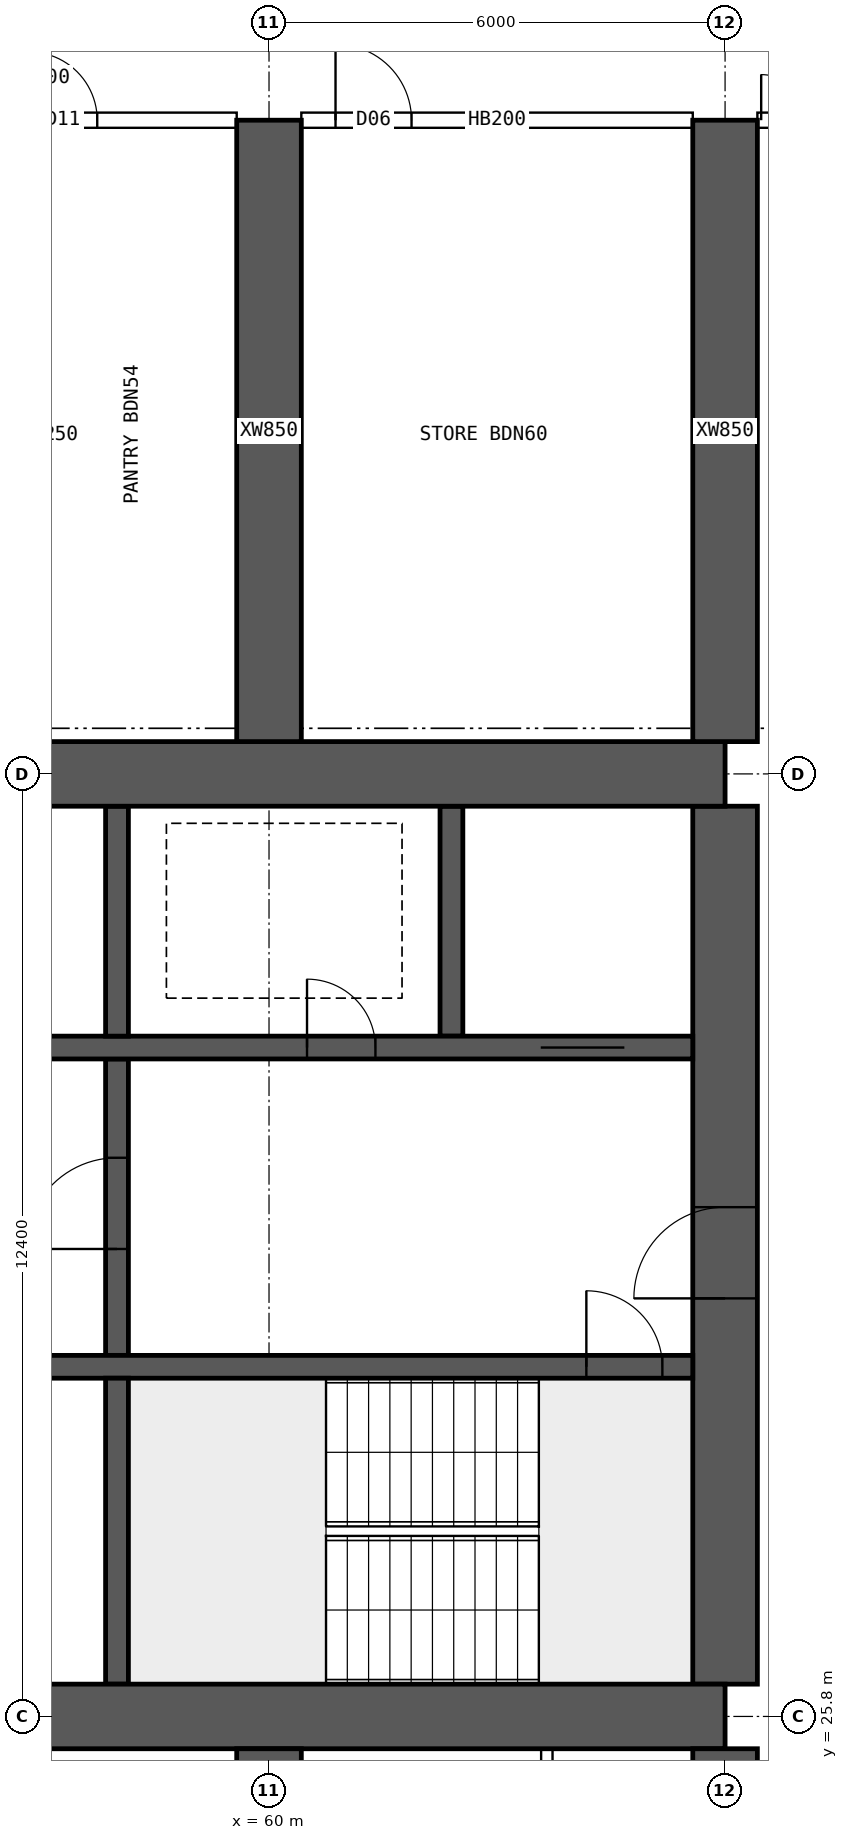
"""IFC4 building model, lengths in metres.
Left out: names, types, materials, properties, quantities, classifications, styles, units other than length and angle.
Written with IfcOpenShell. Run it as: python <this file> out.ifc"""

import sys

from ifc_helpers import new_model, si_unit, direction, frame, frame_2d, origin, place, context, subcontext, project, spatial, rectangle, extrude, element, fill, save


model = new_model("IFC4")
c1 = context("Model", 3, precision=1e-05, world=origin(), true_north=direction((0.0, 1.0)))
c2 = subcontext(c1, "Body", "Model", "MODEL_VIEW")
j1 = project(units=[si_unit("LENGTHUNIT", "METRE"), si_unit("PLANEANGLEUNIT", "RADIAN")], contexts=[c1])
p1 = place(None, origin())
s1 = spatial("IfcSite", under=j1, at=p1, CompositionType="ELEMENT")
p2 = place(p1, origin())
s2 = spatial("IfcBuilding", under=s1, at=p2, CompositionType="ELEMENT")
p3 = place(p2, frame((0.0, 0.0, 193.6)))
s3 = spatial("IfcBuildingStorey", under=s2, at=p3, CompositionType="ELEMENT", Elevation=193.6)
for number, where, z_axis, x_axis in (
    (1, (18.0, 25.8, 0.0), (0.0, 0.0, 1.0), (1.0, 0.0, 0.0)),
    (2, (18.0, 38.2, 0.0), (0.0, 0.0, 1.0), (1.0, 0.0, 0.0)),
):
    element("IfcWall", number, at=place(p3, frame(where, z_axis=z_axis, x_axis=x_axis)), inside=s3, PredefinedType="SHEAR", context=c2, shape_type="SweptSolid", body=[
        extrude(rectangle(XDim=48.0, YDim=0.85, at=frame_2d((24.0, 0.0))), origin(), (0.0, 0.0, 1.0), 3.75),
    ])
p4 = place(p3, frame((66.0, 26.225, 0.0), z_axis=(0.0, 0.0, 1.0), x_axis=(0.0, 1.0, 0.0)))
e3 = element("IfcWall", 3, at=p4, inside=s3, PredefinedType="SHEAR", context=c2, shape_type="SweptSolid", body=[
    extrude(rectangle(XDim=11.55, YDim=0.85, at=frame_2d((5.775, 0.0))), origin(), (0.0, 0.0, 1.0), 3.75),
])
p5 = place(p4, frame((5.075, 0.0, 0.0)))
e4 = element("IfcOpeningElement", 4, at=p5, cuts=e3, PredefinedType="OPENING", context=c2, shape_type="SweptSolid", body=[
    extrude(rectangle(XDim=1.2, YDim=2.1, at=frame_2d((0.6, 1.05))), frame((0.0, 0.435, 0.0), z_axis=(0.0, -1.0, 0.0), x_axis=(1.0, 0.0, 0.0)), (0.0, 0.0, 1.0), 0.87),
])
p6 = place(p3, frame((18.425, 30.4, 0.0), z_axis=(0.0, 0.0, 1.0), x_axis=(1.0, 0.0, 0.0)))
e5 = element("IfcWall", 5, at=p6, inside=s3, PredefinedType="SHEAR", context=c2, shape_type="SweptSolid", body=[
    extrude(rectangle(XDim=47.15, YDim=0.3, at=frame_2d((23.575, 0.0))), origin(), (0.0, 0.0, 1.0), 3.75),
])
p7 = place(p6, frame((0.4, 0.0, 0.0)))
e6 = element("IfcOpeningElement", 6, at=p7, cuts=e5, PredefinedType="OPENING", context=c2, shape_type="SweptSolid", body=[
    extrude(rectangle(XDim=1.0, YDim=2.1, at=frame_2d((0.5, 1.05))), frame((0.0, 0.16, 0.0), z_axis=(0.0, -1.0, 0.0), x_axis=(1.0, 0.0, 0.0)), (0.0, 0.0, 1.0), 0.32),
])
p8 = place(p6, frame((45.75, 0.0, 0.0)))
e7 = element("IfcOpeningElement", 7, at=p8, cuts=e5, PredefinedType="OPENING", context=c2, shape_type="SweptSolid", body=[
    extrude(rectangle(XDim=1.0, YDim=2.1, at=frame_2d((0.5, 1.05))), frame((0.0, 0.16, 0.0), z_axis=(0.0, -1.0, 0.0), x_axis=(1.0, 0.0, 0.0)), (0.0, 0.0, 1.0), 0.32),
])
p9 = place(p6, frame((8.325, 0.0, 0.0)))
e8 = element("IfcOpeningElement", 8, at=p9, cuts=e5, PredefinedType="OPENING", context=c2, shape_type="SweptSolid", body=[
    extrude(rectangle(XDim=1.1, YDim=2.1, at=frame_2d((0.55, 1.05))), frame((0.0, 0.16, 0.0), z_axis=(0.0, -1.0, 0.0), x_axis=(1.0, 0.0, 0.0)), (0.0, 0.0, 1.0), 0.32),
])
p10 = place(p6, frame((10.925, 0.0, 0.0)))
e9 = element("IfcOpeningElement", 9, at=p10, cuts=e5, PredefinedType="OPENING", context=c2, shape_type="SweptSolid", body=[
    extrude(rectangle(XDim=1.1, YDim=2.1, at=frame_2d((0.55, 1.05))), frame((0.0, 0.16, 0.0), z_axis=(0.0, -1.0, 0.0), x_axis=(1.0, 0.0, 0.0)), (0.0, 0.0, 1.0), 0.32),
])
p11 = place(p6, frame((13.525, 0.0, 0.0)))
e10 = element("IfcOpeningElement", 10, at=p11, cuts=e5, PredefinedType="OPENING", context=c2, shape_type="SweptSolid", body=[
    extrude(rectangle(XDim=1.1, YDim=2.1, at=frame_2d((0.55, 1.05))), frame((0.0, 0.16, 0.0), z_axis=(0.0, -1.0, 0.0), x_axis=(1.0, 0.0, 0.0)), (0.0, 0.0, 1.0), 0.32),
])
p12 = place(p6, frame((16.125, 0.0, 0.0)))
e11 = element("IfcOpeningElement", 11, at=p12, cuts=e5, PredefinedType="OPENING", context=c2, shape_type="SweptSolid", body=[
    extrude(rectangle(XDim=1.1, YDim=2.1, at=frame_2d((0.55, 1.05))), frame((0.0, 0.16, 0.0), z_axis=(0.0, -1.0, 0.0), x_axis=(1.0, 0.0, 0.0)), (0.0, 0.0, 1.0), 0.32),
])
p13 = place(p6, frame((18.9, 0.0, 0.0)))
e12 = element("IfcOpeningElement", 12, at=p13, cuts=e5, PredefinedType="OPENING", context=c2, shape_type="SweptSolid", body=[
    extrude(rectangle(XDim=0.9, YDim=2.1, at=frame_2d((0.45, 1.05))), frame((0.0, 0.16, 0.0), z_axis=(0.0, -1.0, 0.0), x_axis=(1.0, 0.0, 0.0)), (0.0, 0.0, 1.0), 0.32),
])
p14 = place(p6, frame((30.192, 0.0, 0.0)))
e13 = element("IfcOpeningElement", 13, at=p14, cuts=e5, PredefinedType="OPENING", context=c2, shape_type="SweptSolid", body=[
    extrude(rectangle(XDim=1.1, YDim=2.1, at=frame_2d((0.55, 1.05))), frame((0.0, 0.16, 0.0), z_axis=(0.0, -1.0, 0.0), x_axis=(1.0, 0.0, 0.0)), (0.0, 0.0, 1.0), 0.32),
])
p15 = place(p6, frame((33.725, 0.0, 0.0)))
e14 = element("IfcOpeningElement", 14, at=p15, cuts=e5, PredefinedType="OPENING", context=c2, shape_type="SweptSolid", body=[
    extrude(rectangle(XDim=1.1, YDim=2.1, at=frame_2d((0.55, 1.05))), frame((0.0, 0.16, 0.0), z_axis=(0.0, -1.0, 0.0), x_axis=(1.0, 0.0, 0.0)), (0.0, 0.0, 1.0), 0.32),
])
p16 = place(p6, frame((37.258, 0.0, 0.0)))
e15 = element("IfcOpeningElement", 15, at=p16, cuts=e5, PredefinedType="OPENING", context=c2, shape_type="SweptSolid", body=[
    extrude(rectangle(XDim=1.1, YDim=2.1, at=frame_2d((0.55, 1.05))), frame((0.0, 0.16, 0.0), z_axis=(0.0, -1.0, 0.0), x_axis=(1.0, 0.0, 0.0)), (0.0, 0.0, 1.0), 0.32),
])
p17 = place(p3, frame((18.425, 34.6, 0.0), z_axis=(0.0, 0.0, 1.0), x_axis=(1.0, 0.0, 0.0)))
e16 = element("IfcWall", 16, at=p17, inside=s3, PredefinedType="SHEAR", context=c2, shape_type="SweptSolid", body=[
    extrude(rectangle(XDim=47.15, YDim=0.3, at=frame_2d((23.575, 0.0))), origin(), (0.0, 0.0, 1.0), 3.75),
])
p18 = place(p17, frame((0.9, 0.0, 0.0)))
e17 = element("IfcOpeningElement", 17, at=p18, cuts=e16, PredefinedType="OPENING", context=c2, shape_type="SweptSolid", body=[
    extrude(rectangle(XDim=1.1, YDim=2.1, at=frame_2d((0.55, 1.05))), frame((0.0, 0.16, 0.0), z_axis=(0.0, -1.0, 0.0), x_axis=(1.0, 0.0, 0.0)), (0.0, 0.0, 1.0), 0.32),
])
p19 = place(p17, frame((45.15, 0.0, 0.0)))
e18 = element("IfcOpeningElement", 18, at=p19, cuts=e16, PredefinedType="OPENING", context=c2, shape_type="SweptSolid", body=[
    extrude(rectangle(XDim=1.1, YDim=2.1, at=frame_2d((0.55, 1.05))), frame((0.0, 0.16, 0.0), z_axis=(0.0, -1.0, 0.0), x_axis=(1.0, 0.0, 0.0)), (0.0, 0.0, 1.0), 0.32),
])
p20 = place(p17, frame((4.175, 0.0, 0.0)))
e19 = element("IfcOpeningElement", 19, at=p20, cuts=e16, PredefinedType="OPENING", context=c2, shape_type="SweptSolid", body=[
    extrude(rectangle(XDim=0.9, YDim=2.1, at=frame_2d((0.45, 1.05))), frame((0.0, 0.16, 0.0), z_axis=(0.0, -1.0, 0.0), x_axis=(1.0, 0.0, 0.0)), (0.0, 0.0, 1.0), 0.32),
])
p21 = place(p17, frame((42.075, 0.0, 0.0)))
e20 = element("IfcOpeningElement", 20, at=p21, cuts=e16, PredefinedType="OPENING", context=c2, shape_type="SweptSolid", body=[
    extrude(rectangle(XDim=0.9, YDim=2.1, at=frame_2d((0.45, 1.05))), frame((0.0, 0.16, 0.0), z_axis=(0.0, -1.0, 0.0), x_axis=(1.0, 0.0, 0.0)), (0.0, 0.0, 1.0), 0.32),
])
p22 = place(p17, frame((8.95, 0.0, 0.0)))
e21 = element("IfcOpeningElement", 21, at=p22, cuts=e16, PredefinedType="OPENING", context=c2, shape_type="SweptSolid", body=[
    extrude(rectangle(XDim=0.9, YDim=2.1, at=frame_2d((0.45, 1.05))), frame((0.0, 0.16, 0.0), z_axis=(0.0, -1.0, 0.0), x_axis=(1.0, 0.0, 0.0)), (0.0, 0.0, 1.0), 0.32),
])
p23 = place(p17, frame((12.924, 0.0, 0.0)))
e22 = element("IfcOpeningElement", 22, at=p23, cuts=e16, PredefinedType="OPENING", context=c2, shape_type="SweptSolid", body=[
    extrude(rectangle(XDim=0.9, YDim=2.1, at=frame_2d((0.45, 1.05))), frame((0.0, 0.16, 0.0), z_axis=(0.0, -1.0, 0.0), x_axis=(1.0, 0.0, 0.0)), (0.0, 0.0, 1.0), 0.32),
])
p24 = place(p17, frame((16.571, 0.0, 0.0)))
e23 = element("IfcOpeningElement", 23, at=p24, cuts=e16, PredefinedType="OPENING", context=c2, shape_type="SweptSolid", body=[
    extrude(rectangle(XDim=0.9, YDim=2.1, at=frame_2d((0.45, 1.05))), frame((0.0, 0.16, 0.0), z_axis=(0.0, -1.0, 0.0), x_axis=(1.0, 0.0, 0.0)), (0.0, 0.0, 1.0), 0.32),
])
p25 = place(p17, frame((20.33, 0.0, 0.0)))
e24 = element("IfcOpeningElement", 24, at=p25, cuts=e16, PredefinedType="OPENING", context=c2, shape_type="SweptSolid", body=[
    extrude(rectangle(XDim=0.9, YDim=2.1, at=frame_2d((0.45, 1.05))), frame((0.0, 0.16, 0.0), z_axis=(0.0, -1.0, 0.0), x_axis=(1.0, 0.0, 0.0)), (0.0, 0.0, 1.0), 0.32),
])
p26 = place(p17, frame((24.736, 0.0, 0.0)))
e25 = element("IfcOpeningElement", 25, at=p26, cuts=e16, PredefinedType="OPENING", context=c2, shape_type="SweptSolid", body=[
    extrude(rectangle(XDim=0.9, YDim=2.1, at=frame_2d((0.45, 1.05))), frame((0.0, 0.16, 0.0), z_axis=(0.0, -1.0, 0.0), x_axis=(1.0, 0.0, 0.0)), (0.0, 0.0, 1.0), 0.32),
])
p27 = place(p17, frame((27.533, 0.0, 0.0)))
e26 = element("IfcOpeningElement", 26, at=p27, cuts=e16, PredefinedType="OPENING", context=c2, shape_type="SweptSolid", body=[
    extrude(rectangle(XDim=0.9, YDim=2.1, at=frame_2d((0.45, 1.05))), frame((0.0, 0.16, 0.0), z_axis=(0.0, -1.0, 0.0), x_axis=(1.0, 0.0, 0.0)), (0.0, 0.0, 1.0), 0.32),
])
p28 = place(p17, frame((29.703, 0.0, 0.0)))
e27 = element("IfcOpeningElement", 27, at=p28, cuts=e16, PredefinedType="OPENING", context=c2, shape_type="SweptSolid", body=[
    extrude(rectangle(XDim=0.9, YDim=2.1, at=frame_2d((0.45, 1.05))), frame((0.0, 0.16, 0.0), z_axis=(0.0, -1.0, 0.0), x_axis=(1.0, 0.0, 0.0)), (0.0, 0.0, 1.0), 0.32),
])
p29 = place(p17, frame((33.502, 0.0, 0.0)))
e28 = element("IfcOpeningElement", 28, at=p29, cuts=e16, PredefinedType="OPENING", context=c2, shape_type="SweptSolid", body=[
    extrude(rectangle(XDim=0.9, YDim=2.1, at=frame_2d((0.45, 1.05))), frame((0.0, 0.16, 0.0), z_axis=(0.0, -1.0, 0.0), x_axis=(1.0, 0.0, 0.0)), (0.0, 0.0, 1.0), 0.32),
])
p30 = place(p17, frame((37.453, 0.0, 0.0)))
e29 = element("IfcOpeningElement", 29, at=p30, cuts=e16, PredefinedType="OPENING", context=c2, shape_type="SweptSolid", body=[
    extrude(rectangle(XDim=0.9, YDim=2.1, at=frame_2d((0.45, 1.05))), frame((0.0, 0.16, 0.0), z_axis=(0.0, -1.0, 0.0), x_axis=(1.0, 0.0, 0.0)), (0.0, 0.0, 1.0), 0.32),
])
p31 = place(p3, frame((58.0, 26.225, 0.0), z_axis=(0.0, 0.0, 1.0), x_axis=(0.0, 1.0, 0.0)))
e30 = element("IfcWall", 30, at=p31, inside=s3, PredefinedType="SHEAR", context=c2, shape_type="SweptSolid", body=[
    extrude(rectangle(XDim=4.025, YDim=0.3, at=frame_2d((2.012, 0.0))), origin(), (0.0, 0.0, 1.0), 3.75),
])
p32 = place(p3, frame((58.0, 30.55, 0.0), z_axis=(0.0, 0.0, 1.0), x_axis=(0.0, 1.0, 0.0)))
e31 = element("IfcWall", 31, at=p32, inside=s3, PredefinedType="SHEAR", context=c2, shape_type="SweptSolid", body=[
    extrude(rectangle(XDim=3.9, YDim=0.3, at=frame_2d((1.95, 0.0))), origin(), (0.0, 0.0, 1.0), 3.75),
])
p33 = place(p32, frame((1.4, 0.0, 0.0)))
e32 = element("IfcOpeningElement", 32, at=p33, cuts=e31, PredefinedType="OPENING", context=c2, shape_type="SweptSolid", body=[
    extrude(rectangle(XDim=1.2, YDim=2.1, at=frame_2d((0.6, 1.05))), frame((0.0, 0.16, 0.0), z_axis=(0.0, -1.0, 0.0), x_axis=(1.0, 0.0, 0.0)), (0.0, 0.0, 1.0), 0.32),
])
for number, where, z_axis, x_axis in (
    (33, (62.4, 34.75, 0.0), (0.0, 0.0, 1.0), (0.0, 1.0, 0.0)),
    (34, (58.0, 34.75, 0.0), (0.0, 0.0, 1.0), (0.0, 1.0, 0.0)),
):
    element("IfcWall", number, at=place(p3, frame(where, z_axis=z_axis, x_axis=x_axis)), inside=s3, PredefinedType="SHEAR", context=c2, shape_type="SweptSolid", body=[
        extrude(rectangle(XDim=3.025, YDim=0.3, at=frame_2d((1.512, 0.0))), origin(), (0.0, 0.0, 1.0), 3.75),
    ])
for number, where, z_axis, x_axis in (
    (35, (60.0, 17.2, 0.0), (0.0, 0.0, 1.0), (0.0, 1.0, 0.0)),
    (36, (60.0, 38.625, 0.0), (0.0, 0.0, 1.0), (0.0, 1.0, 0.0)),
    (37, (66.0, 17.2, 0.0), (0.0, 0.0, 1.0), (0.0, 1.0, 0.0)),
    (38, (66.0, 38.625, 0.0), (0.0, 0.0, 1.0), (0.0, 1.0, 0.0)),
):
    element("IfcWall", number, at=place(p3, frame(where, z_axis=z_axis, x_axis=x_axis)), inside=s3, PredefinedType="SHEAR", context=c2, shape_type="SweptSolid", body=[
        extrude(rectangle(XDim=8.175, YDim=0.85, at=frame_2d((4.087, 0.0))), origin(), (0.0, 0.0, 1.0), 3.75),
    ])
p34 = place(p3, frame((54.425, 46.8, 0.0), z_axis=(0.0, 0.0, 1.0), x_axis=(1.0, 0.0, 0.0)))
e39 = element("IfcWall", 39, at=p34, inside=s3, PredefinedType="SOLIDWALL", context=c2, shape_type="SweptSolid", body=[
    extrude(rectangle(XDim=5.15, YDim=0.2, at=frame_2d((2.575, 0.0))), origin(), (0.0, 0.0, 1.0), 3.5),
])
p35 = place(p34, frame((0.35, 0.0, 0.0)))
e40 = element("IfcOpeningElement", 40, at=p35, cuts=e39, PredefinedType="OPENING", context=c2, shape_type="SweptSolid", body=[
    extrude(rectangle(XDim=0.9, YDim=2.1, at=frame_2d((0.45, 1.05))), frame((0.0, 0.11, 0.0), z_axis=(0.0, -1.0, 0.0), x_axis=(1.0, 0.0, 0.0)), (0.0, 0.0, 1.0), 0.22),
])
p36 = place(p34, frame((2.415, 0.0, 0.0)))
e41 = element("IfcOpeningElement", 41, at=p36, cuts=e39, PredefinedType="OPENING", context=c2, shape_type="SweptSolid", body=[
    extrude(rectangle(XDim=0.9, YDim=2.1, at=frame_2d((0.45, 1.05))), frame((0.0, 0.11, 0.0), z_axis=(0.0, -1.0, 0.0), x_axis=(1.0, 0.0, 0.0)), (0.0, 0.0, 1.0), 0.22),
])
p37 = place(p3, frame((60.425, 46.8, 0.0), z_axis=(0.0, 0.0, 1.0), x_axis=(1.0, 0.0, 0.0)))
e42 = element("IfcWall", 42, at=p37, inside=s3, PredefinedType="SOLIDWALL", context=c2, shape_type="SweptSolid", body=[
    extrude(rectangle(XDim=5.15, YDim=0.2, at=frame_2d((2.575, 0.0))), origin(), (0.0, 0.0, 1.0), 3.5),
])
p38 = place(p37, frame((0.45, 0.0, 0.0)))
e43 = element("IfcOpeningElement", 43, at=p38, cuts=e42, PredefinedType="OPENING", context=c2, shape_type="SweptSolid", body=[
    extrude(rectangle(XDim=1.0, YDim=2.1, at=frame_2d((0.5, 1.05))), frame((0.0, 0.11, 0.0), z_axis=(0.0, -1.0, 0.0), x_axis=(1.0, 0.0, 0.0)), (0.0, 0.0, 1.0), 0.22),
])
p39 = place(p3, frame((66.425, 46.8, 0.0), z_axis=(0.0, 0.0, 1.0), x_axis=(1.0, 0.0, 0.0)))
e44 = element("IfcWall", 44, at=p39, inside=s3, PredefinedType="SOLIDWALL", context=c2, shape_type="SweptSolid", body=[
    extrude(rectangle(XDim=1.975, YDim=0.2, at=frame_2d((0.987, 0.0))), origin(), (0.0, 0.0, 1.0), 3.5),
])
p40 = place(p39, frame((0.05, 0.0, 0.0)))
e45 = element("IfcOpeningElement", 45, at=p40, cuts=e44, PredefinedType="OPENING", context=c2, shape_type="SweptSolid", body=[
    extrude(rectangle(XDim=1.2, YDim=2.1, at=frame_2d((0.6, 1.05))), frame((0.0, 0.11, 0.0), z_axis=(0.0, -1.0, 0.0), x_axis=(1.0, 0.0, 0.0)), (0.0, 0.0, 1.0), 0.22),
])
p41 = place(p3, frame((63.655, 17.3, 0.0), z_axis=(0.0, 0.0, 1.0), x_axis=(0.0, 1.0, 0.0)))
e46 = element("IfcWall", 46, at=p41, inside=s3, PredefinedType="PARTITIONING", context=c2, shape_type="SweptSolid", body=[
    extrude(rectangle(XDim=8.075, YDim=0.15, at=frame_2d((4.038, 0.0))), origin(), (0.0, 0.0, 1.0), 3.5),
])
p42 = place(p5, origin())
e47 = element("IfcDoor", 47, at=p42, inside=s3, OperationType="SINGLE_SWING_LEFT", PredefinedType="DOOR", context=c2, shape_type="SweptSolid", body=[
    extrude(rectangle(XDim=1.2, YDim=2.1, at=frame_2d((0.6, 1.05))), frame((0.0, 0.025, 0.0), z_axis=(0.0, -1.0, 0.0), x_axis=(1.0, 0.0, 0.0)), (0.0, 0.0, 1.0), 0.05),
])
fill(e4, e47)
p43 = place(p8, origin())
e48 = element("IfcDoor", 48, at=p43, inside=s3, OperationType="SINGLE_SWING_LEFT", PredefinedType="DOOR", context=c2, shape_type="SweptSolid", body=[
    extrude(rectangle(XDim=1.0, YDim=2.1, at=frame_2d((0.5, 1.05))), frame((0.0, 0.025, 0.0), z_axis=(0.0, -1.0, 0.0), x_axis=(1.0, 0.0, 0.0)), (0.0, 0.0, 1.0), 0.05),
])
fill(e7, e48)
p44 = place(p19, origin())
e49 = element("IfcDoor", 49, at=p44, inside=s3, OperationType="DOUBLE_DOOR_SLIDING", PredefinedType="DOOR", context=c2, shape_type="SweptSolid", body=[
    extrude(rectangle(XDim=1.1, YDim=2.1, at=frame_2d((0.55, 1.05))), frame((0.0, 0.025, 0.0), z_axis=(0.0, -1.0, 0.0), x_axis=(1.0, 0.0, 0.0)), (0.0, 0.0, 1.0), 0.05),
])
fill(e18, e49)
p45 = place(p21, origin())
e50 = element("IfcDoor", 50, at=p45, inside=s3, OperationType="SINGLE_SWING_LEFT", PredefinedType="DOOR", context=c2, shape_type="SweptSolid", body=[
    extrude(rectangle(XDim=0.9, YDim=2.1, at=frame_2d((0.45, 1.05))), frame((0.0, 0.025, 0.0), z_axis=(0.0, -1.0, 0.0), x_axis=(1.0, 0.0, 0.0)), (0.0, 0.0, 1.0), 0.05),
])
fill(e20, e50)
p46 = place(p33, origin())
e51 = element("IfcDoor", 51, at=p46, inside=s3, OperationType="SINGLE_SWING_LEFT", PredefinedType="DOOR", context=c2, shape_type="SweptSolid", body=[
    extrude(rectangle(XDim=1.2, YDim=2.1, at=frame_2d((0.6, 1.05))), frame((0.0, 0.025, 0.0), z_axis=(0.0, -1.0, 0.0), x_axis=(1.0, 0.0, 0.0)), (0.0, 0.0, 1.0), 0.05),
])
fill(e32, e51)
p47 = place(p40, origin())
e52 = element("IfcDoor", 52, at=p47, inside=s3, OperationType="DOUBLE_DOOR_SINGLE_SWING", PredefinedType="DOOR", context=c2, shape_type="SweptSolid", body=[
    extrude(rectangle(XDim=1.2, YDim=2.1, at=frame_2d((0.6, 1.05))), frame((0.0, 0.025, 0.0), z_axis=(0.0, -1.0, 0.0), x_axis=(1.0, 0.0, 0.0)), (0.0, 0.0, 1.0), 0.05),
])
fill(e45, e52)
p48 = place(p36, origin())
e53 = element("IfcDoor", 53, at=p48, inside=s3, OperationType="SINGLE_SWING_LEFT", PredefinedType="DOOR", context=c2, shape_type="SweptSolid", body=[
    extrude(rectangle(XDim=0.9, YDim=2.1, at=frame_2d((0.45, 1.05))), frame((0.0, 0.025, 0.0), z_axis=(0.0, -1.0, 0.0), x_axis=(1.0, 0.0, 0.0)), (0.0, 0.0, 1.0), 0.05),
])
fill(e41, e53)
p49 = place(p38, origin())
e54 = element("IfcDoor", 54, at=p49, inside=s3, OperationType="SINGLE_SWING_LEFT", PredefinedType="DOOR", context=c2, shape_type="SweptSolid", body=[
    extrude(rectangle(XDim=1.0, YDim=2.1, at=frame_2d((0.5, 1.05))), frame((0.0, 0.025, 0.0), z_axis=(0.0, -1.0, 0.0), x_axis=(1.0, 0.0, 0.0)), (0.0, 0.0, 1.0), 0.05),
])
fill(e43, e54)
save(model, sys.argv[1])
